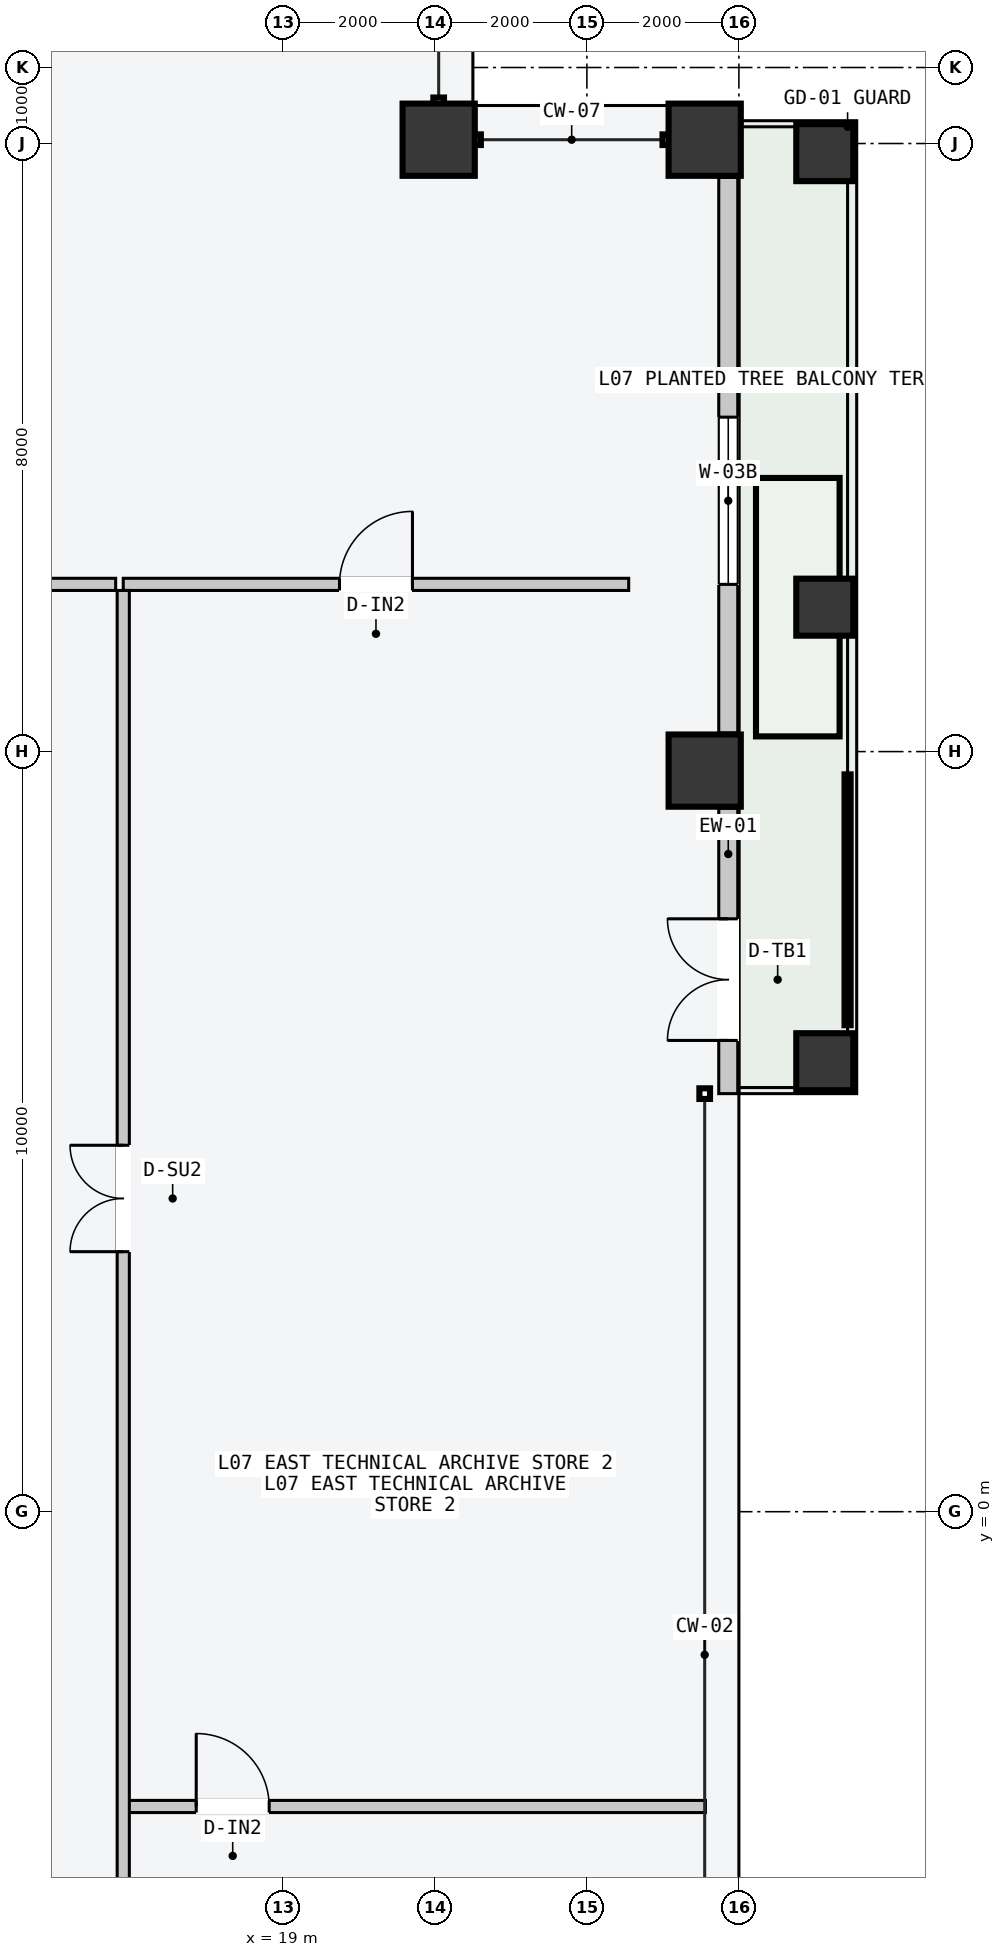
"""IFC4 building model, lengths in metres.
Left out: names, types, materials, properties, quantities, classifications, styles, units other than length and angle.
Written with IfcOpenShell. Run it as: python <this file> out.ifc"""

import sys

from ifc_helpers import new_model, si_unit, direction, frame, frame_2d, origin, origin_2d, place, context, subcontext, project, spatial, rectangle, hollow_rectangle, extrude, element, fill, save


model = new_model("IFC4")
c1 = context("Model", 3, precision=1e-05, world=origin(), true_north=direction((0.0, 1.0)))
c2 = subcontext(c1, "Body", "Model", "MODEL_VIEW")
j1 = project(units=[si_unit("LENGTHUNIT", "METRE"), si_unit("PLANEANGLEUNIT", "RADIAN")], contexts=[c1])
p1 = place(None, origin())
s1 = spatial("IfcSite", under=j1, at=p1, CompositionType="ELEMENT")
p2 = place(p1, origin())
s2 = spatial("IfcBuilding", under=s1, at=p2, CompositionType="ELEMENT")
p3 = place(p2, frame((0.0, 0.0, 31.2)))
s3 = spatial("IfcBuildingStorey", under=s2, at=p3, CompositionType="ELEMENT", Elevation=31.2)
for number, where, z_axis, x_axis in (
    (1, (24.55, 9.75, 0.0), (0.0, 0.0, 1.0), (0.0, 1.0, 0.0)),
    (2, (24.55, 18.05, 0.0), (0.0, 0.0, 1.0), (0.0, 1.0, 0.0)),
    (3, (21.05, 18.05, 0.0), (0.0, 0.0, 1.0), (1.0, 0.0, 0.0)),
):
    element("IfcColumn", number, at=place(p3, frame(where, z_axis=z_axis, x_axis=x_axis)), inside=s3, PredefinedType="COLUMN", context=c2, shape_type="SweptSolid", body=[
        extrude(hollow_rectangle(XDim=0.95, YDim=0.95, WallThickness=0.048, at=origin_2d()), origin(), (0.0, 0.0, 1.0), 3.6),
    ])
for number, where, z_axis, x_axis in (
    (4, (26.13, 5.92, 0.0), (0.0, 0.0, 1.0), (0.0, 1.0, 0.0)),
    (5, (26.13, 17.88, 0.0), (0.0, 0.0, 1.0), (0.0, 1.0, 0.0)),
    (6, (26.13, 11.9, 0.0), (0.0, 0.0, 1.0), (0.0, 1.0, 0.0)),
):
    element("IfcColumn", number, at=place(p3, frame(where, z_axis=z_axis, x_axis=x_axis)), inside=s3, PredefinedType="COLUMN", context=c2, shape_type="SweptSolid", body=[
        extrude(hollow_rectangle(XDim=0.75, YDim=0.75, WallThickness=0.032, at=origin_2d()), origin(), (0.0, 0.0, 1.0), 3.6),
    ])
p4 = place(p3, frame((24.86, 5.5, 0.0), z_axis=(0.0, 0.0, 1.0), x_axis=(0.0, 1.0, 0.0)))
e7 = element("IfcWall", 7, at=p4, inside=s3, PredefinedType="STANDARD", context=c2, shape_type="SweptSolid", body=[
    extrude(rectangle(XDim=3.755, YDim=0.25, at=frame_2d((1.877, 0.0))), origin(), (0.0, 0.0, 1.0), 3.4),
])
p5 = place(p4, frame((0.7, 0.0, 0.0)))
e8 = element("IfcOpeningElement", 8, at=p5, cuts=e7, PredefinedType="OPENING", context=c2, shape_type="SweptSolid", body=[
    extrude(rectangle(XDim=1.6, YDim=2.2, at=frame_2d((0.8, 1.1))), frame((0.0, 0.135, 0.0), z_axis=(0.0, -1.0, 0.0), x_axis=(1.0, 0.0, 0.0)), (0.0, 0.0, 1.0), 0.27),
])
p6 = place(p3, frame((24.86, 10.245, 0.0), z_axis=(0.0, 0.0, 1.0), x_axis=(0.0, 1.0, 0.0)))
e9 = element("IfcWall", 9, at=p6, inside=s3, PredefinedType="STANDARD", context=c2, shape_type="SweptSolid", body=[
    extrude(rectangle(XDim=7.31, YDim=0.25, at=frame_2d((3.655, 0.0))), origin(), (0.0, 0.0, 1.0), 3.4),
])
p7 = place(p6, frame((1.955, 0.0, 0.85)))
e10 = element("IfcOpeningElement", 10, at=p7, cuts=e9, PredefinedType="OPENING", context=c2, shape_type="SweptSolid", body=[
    extrude(rectangle(XDim=2.2, YDim=2.1, at=frame_2d((1.1, 1.05))), frame((0.0, 0.135, 0.0), z_axis=(0.0, -1.0, 0.0), x_axis=(1.0, 0.0, 0.0)), (0.0, 0.0, 1.0), 0.27),
])
p8 = place(p3, frame((-16.8, 12.2, 0.0), z_axis=(0.0, 0.0, 1.0), x_axis=(1.0, 0.0, 0.0)))
e11 = element("IfcWall", 11, at=p8, inside=s3, PredefinedType="PARTITIONING", context=c2, shape_type="SweptSolid", body=[
    extrude(rectangle(XDim=33.6, YDim=0.16, at=frame_2d((16.8, 0.0))), origin(), (0.0, 0.0, 1.0), 3.4),
])
p9 = place(p8, frame((4.684, 0.0, 0.0)))
e12 = element("IfcOpeningElement", 12, at=p9, cuts=e11, PredefinedType="OPENING", context=c2, shape_type="SweptSolid", body=[
    extrude(rectangle(XDim=1.06, YDim=2.2, at=frame_2d((0.53, 1.1))), frame((0.0, 0.09, 0.0), z_axis=(0.0, -1.0, 0.0), x_axis=(1.0, 0.0, 0.0)), (0.0, 0.0, 1.0), 0.18),
])
p10 = place(p8, frame((21.394, 0.0, 0.0)))
e13 = element("IfcOpeningElement", 13, at=p10, cuts=e11, PredefinedType="OPENING", context=c2, shape_type="SweptSolid", body=[
    extrude(rectangle(XDim=1.24, YDim=2.24, at=frame_2d((0.62, 1.12))), frame((0.0, 0.09, 0.0), z_axis=(0.0, -1.0, 0.0), x_axis=(1.0, 0.0, 0.0)), (0.0, 0.0, 1.0), 0.18),
])
p11 = place(p3, frame((16.9, 12.2, 0.0), z_axis=(0.0, 0.0, 1.0), x_axis=(1.0, 0.0, 0.0)))
e14 = element("IfcWall", 14, at=p11, inside=s3, PredefinedType="PARTITIONING", context=c2, shape_type="SweptSolid", body=[
    extrude(rectangle(XDim=6.65, YDim=0.16, at=frame_2d((3.325, 0.0))), origin(), (0.0, 0.0, 1.0), 3.4),
])
p12 = place(p11, frame((2.845, 0.0, 0.0)))
e15 = element("IfcOpeningElement", 15, at=p12, cuts=e14, PredefinedType="OPENING", context=c2, shape_type="SweptSolid", body=[
    extrude(rectangle(XDim=0.96, YDim=2.18, at=frame_2d((0.48, 1.09))), frame((0.0, 0.09, 0.0), z_axis=(0.0, -1.0, 0.0), x_axis=(1.0, 0.0, 0.0)), (0.0, 0.0, 1.0), 0.18),
])
p13 = place(p3, frame((16.96, -3.878, 0.0), z_axis=(0.0, 0.0, 1.0), x_axis=(1.0, 0.0, 0.0)))
e16 = element("IfcWall", 16, at=p13, inside=s3, PredefinedType="PARTITIONING", context=c2, shape_type="SweptSolid", body=[
    extrude(rectangle(XDim=7.6, YDim=0.16, at=frame_2d((3.8, 0.0))), origin(), (0.0, 0.0, 1.0), 3.4),
])
p14 = place(p13, frame((0.9, 0.0, 0.0)))
e17 = element("IfcOpeningElement", 17, at=p14, cuts=e16, PredefinedType="OPENING", context=c2, shape_type="SweptSolid", body=[
    extrude(rectangle(XDim=0.96, YDim=2.18, at=frame_2d((0.48, 1.09))), frame((0.0, 0.09, 0.0), z_axis=(0.0, -1.0, 0.0), x_axis=(1.0, 0.0, 0.0)), (0.0, 0.0, 1.0), 0.18),
])
p15 = place(p3, frame((16.9, -12.12, 0.0), z_axis=(0.0, 0.0, 1.0), x_axis=(0.0, 1.0, 0.0)))
e18 = element("IfcWall", 18, at=p15, inside=s3, PredefinedType="PARTITIONING", context=c2, shape_type="SweptSolid", body=[
    extrude(rectangle(XDim=24.24, YDim=0.16, at=frame_2d((12.12, 0.0))), origin(), (0.0, 0.0, 1.0), 3.4),
])
p16 = place(p15, frame((3.501, 0.0, 0.0)))
e19 = element("IfcOpeningElement", 19, at=p16, cuts=e18, PredefinedType="OPENING", context=c2, shape_type="SweptSolid", body=[
    extrude(rectangle(XDim=1.24, YDim=2.24, at=frame_2d((0.62, 1.12))), frame((0.0, 0.09, 0.0), z_axis=(0.0, -1.0, 0.0), x_axis=(1.0, 0.0, 0.0)), (0.0, 0.0, 1.0), 0.18),
])
p17 = place(p15, frame((15.541, 0.0, 0.0)))
e20 = element("IfcOpeningElement", 20, at=p17, cuts=e18, PredefinedType="OPENING", context=c2, shape_type="SweptSolid", body=[
    extrude(rectangle(XDim=1.4, YDim=2.2, at=frame_2d((0.7, 1.1))), frame((0.0, 0.09, 0.0), z_axis=(0.0, -1.0, 0.0), x_axis=(1.0, 0.0, 0.0)), (0.0, 0.0, 1.0), 0.18),
])
p18 = place(p5, origin())
e21 = element("IfcDoor", 21, at=p18, inside=s3, OperationType="DOUBLE_DOOR_SINGLE_SWING", PredefinedType="DOOR", context=c2, shape_type="SweptSolid", body=[
    extrude(rectangle(XDim=1.6, YDim=2.2, at=frame_2d((0.8, 1.1))), frame((0.0, 0.025, 0.0), z_axis=(0.0, -1.0, 0.0), x_axis=(1.0, 0.0, 0.0)), (0.0, 0.0, 1.0), 0.05),
])
fill(e8, e21)
p19 = place(p7, origin())
e22 = element("IfcWindow", 22, at=p19, inside=s3, PartitioningType="SINGLE_PANEL", PredefinedType="WINDOW", context=c2, shape_type="SweptSolid", body=[
    extrude(rectangle(XDim=2.2, YDim=2.1, at=frame_2d((1.1, 1.05))), frame((0.0, 0.03, 0.0), z_axis=(0.0, -1.0, 0.0), x_axis=(1.0, 0.0, 0.0)), (0.0, 0.0, 1.0), 0.06),
])
fill(e10, e22)
p20 = place(p12, origin())
e23 = element("IfcDoor", 23, at=p20, inside=s3, OperationType="SINGLE_SWING_RIGHT", PredefinedType="DOOR", context=c2, shape_type="SweptSolid", body=[
    extrude(rectangle(XDim=0.96, YDim=2.18, at=frame_2d((0.48, 1.09))), frame((0.0, 0.025, 0.0), z_axis=(0.0, -1.0, 0.0), x_axis=(1.0, 0.0, 0.0)), (0.0, 0.0, 1.0), 0.05),
])
fill(e15, e23)
p21 = place(p14, origin())
e24 = element("IfcDoor", 24, at=p21, inside=s3, OperationType="SINGLE_SWING_LEFT", PredefinedType="DOOR", context=c2, shape_type="SweptSolid", body=[
    extrude(rectangle(XDim=0.96, YDim=2.18, at=frame_2d((0.48, 1.09))), frame((0.0, 0.025, 0.0), z_axis=(0.0, -1.0, 0.0), x_axis=(1.0, 0.0, 0.0)), (0.0, 0.0, 1.0), 0.05),
])
fill(e17, e24)
p22 = place(p17, origin())
e25 = element("IfcDoor", 25, at=p22, inside=s3, OperationType="DOUBLE_DOOR_SINGLE_SWING", PredefinedType="DOOR", context=c2, shape_type="SweptSolid", body=[
    extrude(rectangle(XDim=1.4, YDim=2.2, at=frame_2d((0.7, 1.1))), frame((0.0, 0.025, 0.0), z_axis=(0.0, -1.0, 0.0), x_axis=(1.0, 0.0, 0.0)), (0.0, 0.0, 1.0), 0.05),
])
fill(e20, e25)
save(model, sys.argv[1])
